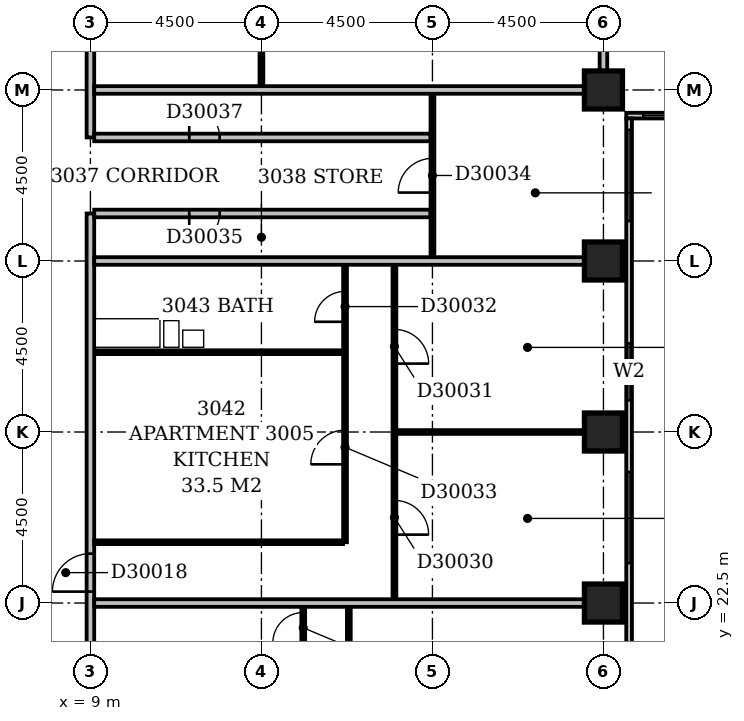
"""IFC4 building model, lengths in metres.
Left out: names, types, materials, properties, quantities, classifications, styles, units other than length and angle.
Written with IfcOpenShell. Run it as: python <this file> out.ifc"""

import sys

from ifc_helpers import new_model, si_unit, direction, frame, frame_2d, origin, origin_2d, place, context, subcontext, project, spatial, rectangle, extrude, element, fill, save


model = new_model("IFC4")
c1 = context("Model", 3, precision=1e-05, world=origin(), true_north=direction((0.0, 1.0)))
c2 = subcontext(c1, "Body", "Model", "MODEL_VIEW")
j1 = project(units=[si_unit("LENGTHUNIT", "METRE"), si_unit("PLANEANGLEUNIT", "RADIAN")], contexts=[c1])
p1 = place(None, origin())
s1 = spatial("IfcSite", under=j1, at=p1, CompositionType="ELEMENT")
p2 = place(p1, origin())
s2 = spatial("IfcBuilding", under=s1, at=p2, CompositionType="ELEMENT")
p3 = place(p2, frame((0.0, 0.0, 123.2)))
s3 = spatial("IfcBuildingStorey", under=s2, at=p3, CompositionType="ELEMENT", Elevation=123.2)
for number, where, z_axis, x_axis in (
    (1, (22.5, 22.5, -0.3), (0.0, 0.0, 1.0), (1.0, 0.0, 0.0)),
    (2, (22.5, 27.0, -0.3), (0.0, 0.0, 1.0), (1.0, 0.0, 0.0)),
    (3, (22.5, 31.5, -0.3), (0.0, 0.0, 1.0), (1.0, 0.0, 0.0)),
    (4, (22.5, 36.0, -0.3), (0.0, 0.0, 1.0), (1.0, 0.0, 0.0)),
):
    element("IfcColumn", number, at=place(p3, frame(where, z_axis=z_axis, x_axis=x_axis)), inside=s3, PredefinedType="COLUMN", context=c2, shape_type="SweptSolid", body=[
        extrude(rectangle(XDim=1.0, YDim=1.0, at=origin_2d()), origin(), (0.0, 0.0, 1.0), 3.6),
    ])
p4 = place(p3, frame((23.175, 17.4, 0.0), z_axis=(0.0, 0.0, 1.0), x_axis=(0.0, 1.0, 0.0)))
e5 = element("IfcWall", 5, at=p4, inside=s3, PredefinedType="STANDARD", context=c2, shape_type="SweptSolid", body=[
    extrude(rectangle(XDim=17.85, YDim=0.15, at=frame_2d((8.925, 0.0))), origin(), (0.0, 0.0, 1.0), 2.7),
])
p5 = place(p4, frame((1.65, 0.0, 0.6)))
e6 = element("IfcOpeningElement", 6, at=p5, cuts=e5, PredefinedType="OPENING", context=c2, shape_type="SweptSolid", body=[
    extrude(rectangle(XDim=2.4, YDim=1.8, at=frame_2d((1.2, 0.9))), frame((0.0, 0.087, 0.0), z_axis=(0.0, -1.0, 0.0), x_axis=(1.0, 0.0, 0.0)), (0.0, 0.0, 1.0), 0.174),
])
p6 = place(p4, frame((6.15, 0.0, 0.6)))
e7 = element("IfcOpeningElement", 7, at=p6, cuts=e5, PredefinedType="OPENING", context=c2, shape_type="SweptSolid", body=[
    extrude(rectangle(XDim=2.4, YDim=1.8, at=frame_2d((1.2, 0.9))), frame((0.0, 0.087, 0.0), z_axis=(0.0, -1.0, 0.0), x_axis=(1.0, 0.0, 0.0)), (0.0, 0.0, 1.0), 0.174),
])
p7 = place(p4, frame((10.433, 0.0, 0.6)))
e8 = element("IfcOpeningElement", 8, at=p7, cuts=e5, PredefinedType="OPENING", context=c2, shape_type="SweptSolid", body=[
    extrude(rectangle(XDim=1.5, YDim=1.8, at=frame_2d((0.75, 0.9))), frame((0.0, 0.087, 0.0), z_axis=(0.0, -1.0, 0.0), x_axis=(1.0, 0.0, 0.0)), (0.0, 0.0, 1.0), 0.174),
])
p8 = place(p4, frame((15.15, 0.0, 0.6)))
e9 = element("IfcOpeningElement", 9, at=p8, cuts=e5, PredefinedType="OPENING", context=c2, shape_type="SweptSolid", body=[
    extrude(rectangle(XDim=2.4, YDim=1.8, at=frame_2d((1.2, 0.9))), frame((0.0, 0.087, 0.0), z_axis=(0.0, -1.0, 0.0), x_axis=(1.0, 0.0, 0.0)), (0.0, 0.0, 1.0), 0.174),
])
p9 = place(p3, frame((23.1, 35.325, 0.0), z_axis=(0.0, 0.0, 1.0), x_axis=(1.0, 0.0, 0.0)))
e10 = element("IfcWall", 10, at=p9, inside=s3, PredefinedType="STANDARD", context=c2, shape_type="SweptSolid", body=[
    extrude(rectangle(XDim=45.15, YDim=0.15, at=frame_2d((22.575, 0.0))), origin(), (0.0, 0.0, 1.0), 2.7),
])
p10 = place(p9, frame((0.45, 0.0, 0.6)))
e11 = element("IfcOpeningElement", 11, at=p10, cuts=e10, PredefinedType="OPENING", context=c2, shape_type="SweptSolid", body=[
    extrude(rectangle(XDim=2.4, YDim=1.8, at=frame_2d((1.2, 0.9))), frame((0.0, 0.087, 0.0), z_axis=(0.0, -1.0, 0.0), x_axis=(1.0, 0.0, 0.0)), (0.0, 0.0, 1.0), 0.174),
])
p11 = place(p9, frame((4.95, 0.0, 0.6)))
e12 = element("IfcOpeningElement", 12, at=p11, cuts=e10, PredefinedType="OPENING", context=c2, shape_type="SweptSolid", body=[
    extrude(rectangle(XDim=2.4, YDim=1.8, at=frame_2d((1.2, 0.9))), frame((0.0, 0.087, 0.0), z_axis=(0.0, -1.0, 0.0), x_axis=(1.0, 0.0, 0.0)), (0.0, 0.0, 1.0), 0.174),
])
p12 = place(p9, frame((10.598, 0.0, 0.6)))
e13 = element("IfcOpeningElement", 13, at=p12, cuts=e10, PredefinedType="OPENING", context=c2, shape_type="SweptSolid", body=[
    extrude(rectangle(XDim=1.5, YDim=1.8, at=frame_2d((0.75, 0.9))), frame((0.0, 0.087, 0.0), z_axis=(0.0, -1.0, 0.0), x_axis=(1.0, 0.0, 0.0)), (0.0, 0.0, 1.0), 0.174),
])
p13 = place(p9, frame((13.66, 0.0, 0.6)))
e14 = element("IfcOpeningElement", 14, at=p13, cuts=e10, PredefinedType="OPENING", context=c2, shape_type="SweptSolid", body=[
    extrude(rectangle(XDim=1.8, YDim=1.8, at=frame_2d((0.9, 0.9))), frame((0.0, 0.087, 0.0), z_axis=(0.0, -1.0, 0.0), x_axis=(1.0, 0.0, 0.0)), (0.0, 0.0, 1.0), 0.174),
])
p14 = place(p9, frame((18.45, 0.0, 0.6)))
e15 = element("IfcOpeningElement", 15, at=p14, cuts=e10, PredefinedType="OPENING", context=c2, shape_type="SweptSolid", body=[
    extrude(rectangle(XDim=2.4, YDim=1.8, at=frame_2d((1.2, 0.9))), frame((0.0, 0.087, 0.0), z_axis=(0.0, -1.0, 0.0), x_axis=(1.0, 0.0, 0.0)), (0.0, 0.0, 1.0), 0.174),
])
p15 = place(p9, frame((22.95, 0.0, 0.6)))
e16 = element("IfcOpeningElement", 16, at=p15, cuts=e10, PredefinedType="OPENING", context=c2, shape_type="SweptSolid", body=[
    extrude(rectangle(XDim=2.4, YDim=1.8, at=frame_2d((1.2, 0.9))), frame((0.0, 0.087, 0.0), z_axis=(0.0, -1.0, 0.0), x_axis=(1.0, 0.0, 0.0)), (0.0, 0.0, 1.0), 0.174),
])
p16 = place(p9, frame((27.45, 0.0, 0.6)))
e17 = element("IfcOpeningElement", 17, at=p16, cuts=e10, PredefinedType="OPENING", context=c2, shape_type="SweptSolid", body=[
    extrude(rectangle(XDim=2.4, YDim=1.8, at=frame_2d((1.2, 0.9))), frame((0.0, 0.087, 0.0), z_axis=(0.0, -1.0, 0.0), x_axis=(1.0, 0.0, 0.0)), (0.0, 0.0, 1.0), 0.174),
])
p17 = place(p9, frame((31.95, 0.0, 0.6)))
e18 = element("IfcOpeningElement", 18, at=p17, cuts=e10, PredefinedType="OPENING", context=c2, shape_type="SweptSolid", body=[
    extrude(rectangle(XDim=2.4, YDim=1.8, at=frame_2d((1.2, 0.9))), frame((0.0, 0.087, 0.0), z_axis=(0.0, -1.0, 0.0), x_axis=(1.0, 0.0, 0.0)), (0.0, 0.0, 1.0), 0.174),
])
p18 = place(p9, frame((36.131, 0.0, 0.6)))
e19 = element("IfcOpeningElement", 19, at=p18, cuts=e10, PredefinedType="OPENING", context=c2, shape_type="SweptSolid", body=[
    extrude(rectangle(XDim=2.4, YDim=1.8, at=frame_2d((1.2, 0.9))), frame((0.0, 0.087, 0.0), z_axis=(0.0, -1.0, 0.0), x_axis=(1.0, 0.0, 0.0)), (0.0, 0.0, 1.0), 0.174),
])
p19 = place(p9, frame((40.95, 0.0, 0.6)))
e20 = element("IfcOpeningElement", 20, at=p19, cuts=e10, PredefinedType="OPENING", context=c2, shape_type="SweptSolid", body=[
    extrude(rectangle(XDim=2.4, YDim=1.8, at=frame_2d((1.2, 0.9))), frame((0.0, 0.087, 0.0), z_axis=(0.0, -1.0, 0.0), x_axis=(1.0, 0.0, 0.0)), (0.0, 0.0, 1.0), 0.174),
])
p20 = place(p3, frame((9.0, 5.0, 0.0), z_axis=(0.0, 0.0, 1.0), x_axis=(0.0, 1.0, 0.0)))
e21 = element("IfcWall", 21, at=p20, inside=s3, PredefinedType="PARTITIONING", context=c2, shape_type="SweptSolid", body=[
    extrude(rectangle(XDim=27.75, YDim=0.2, at=frame_2d((13.875, 0.0))), origin(), (0.0, 0.0, 1.0), 3.3),
])
p21 = place(p20, frame((17.8, 0.0, 0.0)))
e22 = element("IfcOpeningElement", 22, at=p21, cuts=e21, PredefinedType="OPENING", context=c2, shape_type="SweptSolid", body=[
    extrude(rectangle(XDim=1.0, YDim=2.1, at=frame_2d((0.5, 1.05))), frame((0.0, 0.112, 0.0), z_axis=(0.0, -1.0, 0.0), x_axis=(1.0, 0.0, 0.0)), (0.0, 0.0, 1.0), 0.224),
])
p22 = place(p20, frame((14.95, 0.0, 0.0)))
e23 = element("IfcOpeningElement", 23, at=p22, cuts=e21, PredefinedType="OPENING", context=c2, shape_type="SweptSolid", body=[
    extrude(rectangle(XDim=1.0, YDim=2.1, at=frame_2d((0.5, 1.05))), frame((0.0, 0.112, 0.0), z_axis=(0.0, -1.0, 0.0), x_axis=(1.0, 0.0, 0.0)), (0.0, 0.0, 1.0), 0.224),
])
p23 = place(p20, frame((9.3, 0.0, 0.0)))
e24 = element("IfcOpeningElement", 24, at=p23, cuts=e21, PredefinedType="OPENING", context=c2, shape_type="SweptSolid", body=[
    extrude(rectangle(XDim=1.0, YDim=2.1, at=frame_2d((0.5, 1.05))), frame((0.0, 0.112, 0.0), z_axis=(0.0, -1.0, 0.0), x_axis=(1.0, 0.0, 0.0)), (0.0, 0.0, 1.0), 0.224),
])
p24 = place(p20, frame((1.5, 0.0, 0.0)))
e25 = element("IfcOpeningElement", 25, at=p24, cuts=e21, PredefinedType="OPENING", context=c2, shape_type="SweptSolid", body=[
    extrude(rectangle(XDim=0.9, YDim=2.1, at=frame_2d((0.45, 1.05))), frame((0.0, 0.112, 0.0), z_axis=(0.0, -1.0, 0.0), x_axis=(1.0, 0.0, 0.0)), (0.0, 0.0, 1.0), 0.224),
])
p25 = place(p3, frame((15.8, 18.1, 0.0), z_axis=(0.0, 0.0, 1.0), x_axis=(0.0, 1.0, 0.0)))
e26 = element("IfcWall", 26, at=p25, inside=s3, PredefinedType="PARTITIONING", context=c2, shape_type="SweptSolid", body=[
    extrude(rectangle(XDim=4.3, YDim=0.1, at=frame_2d((2.15, 0.0))), origin(), (0.0, 0.0, 1.0), 3.3),
])
p26 = place(p25, frame((1.7, 0.0, 0.0)))
e27 = element("IfcOpeningElement", 27, at=p26, cuts=e26, PredefinedType="OPENING", context=c2, shape_type="SweptSolid", body=[
    extrude(rectangle(XDim=0.9, YDim=2.1, at=frame_2d((0.45, 1.05))), frame((0.0, 0.062, 0.0), z_axis=(0.0, -1.0, 0.0), x_axis=(1.0, 0.0, 0.0)), (0.0, 0.0, 1.0), 0.124),
])
p27 = place(p3, frame((14.6, 21.2, 0.0), z_axis=(0.0, 0.0, 1.0), x_axis=(0.0, 1.0, 0.0)))
e28 = element("IfcWall", 28, at=p27, inside=s3, PredefinedType="PARTITIONING", context=c2, shape_type="SweptSolid", body=[
    extrude(rectangle(XDim=1.2, YDim=0.1, at=frame_2d((0.6, 0.0))), origin(), (0.0, 0.0, 1.0), 3.3),
])
p28 = place(p27, frame((0.25, 0.0, 0.0)))
e29 = element("IfcOpeningElement", 29, at=p28, cuts=e28, PredefinedType="OPENING", context=c2, shape_type="SweptSolid", body=[
    extrude(rectangle(XDim=0.8, YDim=2.1, at=frame_2d((0.4, 1.05))), frame((0.0, 0.062, 0.0), z_axis=(0.0, -1.0, 0.0), x_axis=(1.0, 0.0, 0.0)), (0.0, 0.0, 1.0), 0.124),
])
p29 = place(p3, frame((9.1, 22.5, 0.0), z_axis=(0.0, 0.0, 1.0), x_axis=(1.0, 0.0, 0.0)))
e30 = element("IfcWall", 30, at=p29, inside=s3, PredefinedType="PARTITIONING", context=c2, shape_type="SweptSolid", body=[
    extrude(rectangle(XDim=12.9, YDim=0.2, at=frame_2d((6.45, 0.0))), origin(), (0.0, 0.0, 1.0), 3.3),
])
p30 = place(p3, frame((17.0, 22.6, 0.0), z_axis=(0.0, 0.0, 1.0), x_axis=(0.0, 1.0, 0.0)))
e31 = element("IfcWall", 31, at=p30, inside=s3, PredefinedType="PARTITIONING", context=c2, shape_type="SweptSolid", body=[
    extrude(rectangle(XDim=8.8, YDim=0.1, at=frame_2d((4.4, 0.0))), origin(), (0.0, 0.0, 1.0), 3.3),
])
p31 = place(p30, frame((1.7, 0.0, 0.0)))
e32 = element("IfcOpeningElement", 32, at=p31, cuts=e31, PredefinedType="OPENING", context=c2, shape_type="SweptSolid", body=[
    extrude(rectangle(XDim=0.9, YDim=2.1, at=frame_2d((0.45, 1.05))), frame((0.0, 0.062, 0.0), z_axis=(0.0, -1.0, 0.0), x_axis=(1.0, 0.0, 0.0)), (0.0, 0.0, 1.0), 0.124),
])
p32 = place(p30, frame((6.2, 0.0, 0.0)))
e33 = element("IfcOpeningElement", 33, at=p32, cuts=e31, PredefinedType="OPENING", context=c2, shape_type="SweptSolid", body=[
    extrude(rectangle(XDim=0.9, YDim=2.1, at=frame_2d((0.45, 1.05))), frame((0.0, 0.062, 0.0), z_axis=(0.0, -1.0, 0.0), x_axis=(1.0, 0.0, 0.0)), (0.0, 0.0, 1.0), 0.124),
])
p33 = place(p3, frame((9.1, 24.1, 0.0), z_axis=(0.0, 0.0, 1.0), x_axis=(1.0, 0.0, 0.0)))
e34 = element("IfcWall", 34, at=p33, inside=s3, PredefinedType="PARTITIONING", context=c2, shape_type="SweptSolid", body=[
    extrude(rectangle(XDim=6.55, YDim=0.1, at=frame_2d((3.275, 0.0))), origin(), (0.0, 0.0, 1.0), 3.3),
])
p34 = place(p3, frame((15.7, 24.1, 0.0), z_axis=(0.0, 0.0, 1.0), x_axis=(0.0, 1.0, 0.0)))
e35 = element("IfcWall", 35, at=p34, inside=s3, PredefinedType="PARTITIONING", context=c2, shape_type="SweptSolid", body=[
    extrude(rectangle(XDim=7.3, YDim=0.1, at=frame_2d((3.65, 0.0))), origin(), (0.0, 0.0, 1.0), 3.3),
])
p35 = place(p34, frame((5.8, 0.0, 0.0)))
e36 = element("IfcOpeningElement", 36, at=p35, cuts=e35, PredefinedType="OPENING", context=c2, shape_type="SweptSolid", body=[
    extrude(rectangle(XDim=0.8, YDim=2.1, at=frame_2d((0.4, 1.05))), frame((0.0, 0.062, 0.0), z_axis=(0.0, -1.0, 0.0), x_axis=(1.0, 0.0, 0.0)), (0.0, 0.0, 1.0), 0.124),
])
p36 = place(p34, frame((2.05, 0.0, 0.0)))
e37 = element("IfcOpeningElement", 37, at=p36, cuts=e35, PredefinedType="OPENING", context=c2, shape_type="SweptSolid", body=[
    extrude(rectangle(XDim=0.9, YDim=2.1, at=frame_2d((0.45, 1.05))), frame((0.0, 0.062, 0.0), z_axis=(0.0, -1.0, 0.0), x_axis=(1.0, 0.0, 0.0)), (0.0, 0.0, 1.0), 0.124),
])
p37 = place(p3, frame((17.05, 27.0, 0.0), z_axis=(0.0, 0.0, 1.0), x_axis=(1.0, 0.0, 0.0)))
e38 = element("IfcWall", 38, at=p37, inside=s3, PredefinedType="PARTITIONING", context=c2, shape_type="SweptSolid", body=[
    extrude(rectangle(XDim=4.95, YDim=0.1, at=frame_2d((2.475, 0.0))), origin(), (0.0, 0.0, 1.0), 2.7),
])
p38 = place(p3, frame((9.1, 29.1, 0.0), z_axis=(0.0, 0.0, 1.0), x_axis=(1.0, 0.0, 0.0)))
e39 = element("IfcWall", 39, at=p38, inside=s3, PredefinedType="PLUMBINGWALL", context=c2, shape_type="SweptSolid", body=[
    extrude(rectangle(XDim=6.55, YDim=0.1, at=frame_2d((3.275, 0.0))), origin(), (0.0, 0.0, 1.0), 3.3),
])
p39 = place(p3, frame((9.1, 31.5, 0.0), z_axis=(0.0, 0.0, 1.0), x_axis=(1.0, 0.0, 0.0)))
e40 = element("IfcWall", 40, at=p39, inside=s3, PredefinedType="PARTITIONING", context=c2, shape_type="SweptSolid", body=[
    extrude(rectangle(XDim=12.9, YDim=0.2, at=frame_2d((6.45, 0.0))), origin(), (0.0, 0.0, 1.0), 3.3),
])
p40 = place(p3, frame((18.0, 31.6, 0.0), z_axis=(0.0, 0.0, 1.0), x_axis=(0.0, 1.0, 0.0)))
e41 = element("IfcWall", 41, at=p40, inside=s3, PredefinedType="PARTITIONING", context=c2, shape_type="SweptSolid", body=[
    extrude(rectangle(XDim=4.3, YDim=0.1, at=frame_2d((2.15, 0.0))), origin(), (0.0, 0.0, 1.0), 3.3),
])
p41 = place(p40, frame((1.7, 0.0, 0.0)))
e42 = element("IfcOpeningElement", 42, at=p41, cuts=e41, PredefinedType="OPENING", context=c2, shape_type="SweptSolid", body=[
    extrude(rectangle(XDim=0.9, YDim=2.1, at=frame_2d((0.45, 1.05))), frame((0.0, 0.062, 0.0), z_axis=(0.0, -1.0, 0.0), x_axis=(1.0, 0.0, 0.0)), (0.0, 0.0, 1.0), 0.124),
])
p42 = place(p3, frame((9.1, 32.75, 0.0), z_axis=(0.0, 0.0, 1.0), x_axis=(1.0, 0.0, 0.0)))
e43 = element("IfcWall", 43, at=p42, inside=s3, PredefinedType="PARTITIONING", context=c2, shape_type="SweptSolid", body=[
    extrude(rectangle(XDim=8.85, YDim=0.2, at=frame_2d((4.425, 0.0))), origin(), (0.0, 0.0, 1.0), 3.3),
])
p43 = place(p42, frame((2.5, 0.0, 0.0)))
e44 = element("IfcOpeningElement", 44, at=p43, cuts=e43, PredefinedType="OPENING", context=c2, shape_type="SweptSolid", body=[
    extrude(rectangle(XDim=0.8, YDim=2.1, at=frame_2d((0.4, 1.05))), frame((0.0, 0.112, 0.0), z_axis=(0.0, -1.0, 0.0), x_axis=(1.0, 0.0, 0.0)), (0.0, 0.0, 1.0), 0.224),
])
p44 = place(p3, frame((9.0, 34.75, 0.0), z_axis=(0.0, 0.0, 1.0), x_axis=(0.0, 1.0, 0.0)))
e45 = element("IfcWall", 45, at=p44, inside=s3, PredefinedType="PARTITIONING", context=c2, shape_type="SweptSolid", body=[
    extrude(rectangle(XDim=14.75, YDim=0.2, at=frame_2d((7.375, 0.0))), origin(), (0.0, 0.0, 1.0), 3.3),
])
p45 = place(p44, frame((7.5, 0.0, 0.0)))
e46 = element("IfcOpeningElement", 46, at=p45, cuts=e45, PredefinedType="OPENING", context=c2, shape_type="SweptSolid", body=[
    extrude(rectangle(XDim=0.9, YDim=2.1, at=frame_2d((0.45, 1.05))), frame((0.0, 0.112, 0.0), z_axis=(0.0, -1.0, 0.0), x_axis=(1.0, 0.0, 0.0)), (0.0, 0.0, 1.0), 0.224),
])
p46 = place(p3, frame((9.1, 34.75, 0.0), z_axis=(0.0, 0.0, 1.0), x_axis=(1.0, 0.0, 0.0)))
e47 = element("IfcWall", 47, at=p46, inside=s3, PredefinedType="PARTITIONING", context=c2, shape_type="SweptSolid", body=[
    extrude(rectangle(XDim=8.85, YDim=0.2, at=frame_2d((4.425, 0.0))), origin(), (0.0, 0.0, 1.0), 3.3),
])
p47 = place(p46, frame((2.5, 0.0, 0.0)))
e48 = element("IfcOpeningElement", 48, at=p47, cuts=e47, PredefinedType="OPENING", context=c2, shape_type="SweptSolid", body=[
    extrude(rectangle(XDim=0.8, YDim=2.1, at=frame_2d((0.4, 1.05))), frame((0.0, 0.112, 0.0), z_axis=(0.0, -1.0, 0.0), x_axis=(1.0, 0.0, 0.0)), (0.0, 0.0, 1.0), 0.224),
])
p48 = place(p3, frame((9.1, 36.0, 0.0), z_axis=(0.0, 0.0, 1.0), x_axis=(1.0, 0.0, 0.0)))
e49 = element("IfcWall", 49, at=p48, inside=s3, PredefinedType="PARTITIONING", context=c2, shape_type="SweptSolid", body=[
    extrude(rectangle(XDim=12.9, YDim=0.2, at=frame_2d((6.45, 0.0))), origin(), (0.0, 0.0, 1.0), 3.3),
])
p49 = place(p3, frame((13.5, 36.1, 0.0), z_axis=(0.0, 0.0, 1.0), x_axis=(0.0, 1.0, 0.0)))
e50 = element("IfcWall", 50, at=p49, inside=s3, PredefinedType="PARTITIONING", context=c2, shape_type="SweptSolid", body=[
    extrude(rectangle(XDim=13.3, YDim=0.1, at=frame_2d((6.65, 0.0))), origin(), (0.0, 0.0, 1.0), 3.3),
])
p50 = place(p3, frame((22.5, 36.5, 0.0), z_axis=(0.0, 0.0, 1.0), x_axis=(0.0, 1.0, 0.0)))
e51 = element("IfcWall", 51, at=p50, inside=s3, PredefinedType="PARTITIONING", context=c2, shape_type="SweptSolid", body=[
    extrude(rectangle(XDim=12.9, YDim=0.2, at=frame_2d((6.45, 0.0))), origin(), (0.0, 0.0, 1.0), 3.3),
])
p51 = place(p6, origin())
e52 = element("IfcWindow", 52, at=p51, inside=s3, PartitioningType="SINGLE_PANEL", PredefinedType="WINDOW", context=c2, shape_type="SweptSolid", body=[
    extrude(rectangle(XDim=2.4, YDim=1.8, at=frame_2d((1.2, 0.9))), frame((0.0, 0.03, 0.0), z_axis=(0.0, -1.0, 0.0), x_axis=(1.0, 0.0, 0.0)), (0.0, 0.0, 1.0), 0.06),
])
fill(e7, e52)
p52 = place(p7, origin())
e53 = element("IfcWindow", 53, at=p52, inside=s3, PartitioningType="SINGLE_PANEL", PredefinedType="WINDOW", context=c2, shape_type="SweptSolid", body=[
    extrude(rectangle(XDim=1.5, YDim=1.8, at=frame_2d((0.75, 0.9))), frame((0.0, 0.03, 0.0), z_axis=(0.0, -1.0, 0.0), x_axis=(1.0, 0.0, 0.0)), (0.0, 0.0, 1.0), 0.06),
])
fill(e8, e53)
p53 = place(p8, origin())
e54 = element("IfcWindow", 54, at=p53, inside=s3, PartitioningType="SINGLE_PANEL", PredefinedType="WINDOW", context=c2, shape_type="SweptSolid", body=[
    extrude(rectangle(XDim=2.4, YDim=1.8, at=frame_2d((1.2, 0.9))), frame((0.0, 0.03, 0.0), z_axis=(0.0, -1.0, 0.0), x_axis=(1.0, 0.0, 0.0)), (0.0, 0.0, 1.0), 0.06),
])
fill(e9, e54)
p54 = place(p10, origin())
e55 = element("IfcWindow", 55, at=p54, inside=s3, PartitioningType="SINGLE_PANEL", PredefinedType="WINDOW", context=c2, shape_type="SweptSolid", body=[
    extrude(rectangle(XDim=2.4, YDim=1.8, at=frame_2d((1.2, 0.9))), frame((0.0, 0.03, 0.0), z_axis=(0.0, -1.0, 0.0), x_axis=(1.0, 0.0, 0.0)), (0.0, 0.0, 1.0), 0.06),
])
fill(e11, e55)
p55 = place(p21, origin())
e56 = element("IfcDoor", 56, at=p55, inside=s3, OperationType="SINGLE_SWING_LEFT", PredefinedType="DOOR", context=c2, shape_type="SweptSolid", body=[
    extrude(rectangle(XDim=1.0, YDim=2.1, at=frame_2d((0.5, 1.05))), frame((0.0, 0.025, 0.0), z_axis=(0.0, -1.0, 0.0), x_axis=(1.0, 0.0, 0.0)), (0.0, 0.0, 1.0), 0.05),
])
fill(e22, e56)
p56 = place(p28, origin())
e57 = element("IfcDoor", 57, at=p56, inside=s3, OperationType="SINGLE_SWING_LEFT", PredefinedType="DOOR", context=c2, shape_type="SweptSolid", body=[
    extrude(rectangle(XDim=0.8, YDim=2.1, at=frame_2d((0.4, 1.05))), frame((0.0, 0.025, 0.0), z_axis=(0.0, -1.0, 0.0), x_axis=(1.0, 0.0, 0.0)), (0.0, 0.0, 1.0), 0.05),
])
fill(e29, e57)
p57 = place(p31, frame((0.9, 0.0, 0.0), z_axis=(0.0, 0.0, 1.0), x_axis=(-1.0, 0.0, 0.0)))
e58 = element("IfcDoor", 58, at=p57, inside=s3, OperationType="SINGLE_SWING_RIGHT", PredefinedType="DOOR", context=c2, shape_type="SweptSolid", body=[
    extrude(rectangle(XDim=0.9, YDim=2.1, at=frame_2d((0.45, 1.05))), frame((0.0, 0.025, 0.0), z_axis=(0.0, -1.0, 0.0), x_axis=(1.0, 0.0, 0.0)), (0.0, 0.0, 1.0), 0.05),
])
fill(e32, e58)
p58 = place(p32, frame((0.9, 0.0, 0.0), z_axis=(0.0, 0.0, 1.0), x_axis=(-1.0, 0.0, 0.0)))
e59 = element("IfcDoor", 59, at=p58, inside=s3, OperationType="SINGLE_SWING_RIGHT", PredefinedType="DOOR", context=c2, shape_type="SweptSolid", body=[
    extrude(rectangle(XDim=0.9, YDim=2.1, at=frame_2d((0.45, 1.05))), frame((0.0, 0.025, 0.0), z_axis=(0.0, -1.0, 0.0), x_axis=(1.0, 0.0, 0.0)), (0.0, 0.0, 1.0), 0.05),
])
fill(e33, e59)
p59 = place(p35, origin())
e60 = element("IfcDoor", 60, at=p59, inside=s3, OperationType="SINGLE_SWING_LEFT", PredefinedType="DOOR", context=c2, shape_type="SweptSolid", body=[
    extrude(rectangle(XDim=0.8, YDim=2.1, at=frame_2d((0.4, 1.05))), frame((0.0, 0.025, 0.0), z_axis=(0.0, -1.0, 0.0), x_axis=(1.0, 0.0, 0.0)), (0.0, 0.0, 1.0), 0.05),
])
fill(e36, e60)
p60 = place(p36, origin())
e61 = element("IfcDoor", 61, at=p60, inside=s3, OperationType="SINGLE_SWING_LEFT", PredefinedType="DOOR", context=c2, shape_type="SweptSolid", body=[
    extrude(rectangle(XDim=0.9, YDim=2.1, at=frame_2d((0.45, 1.05))), frame((0.0, 0.025, 0.0), z_axis=(0.0, -1.0, 0.0), x_axis=(1.0, 0.0, 0.0)), (0.0, 0.0, 1.0), 0.05),
])
fill(e37, e61)
p61 = place(p41, origin())
e62 = element("IfcDoor", 62, at=p61, inside=s3, OperationType="SINGLE_SWING_LEFT", PredefinedType="DOOR", context=c2, shape_type="SweptSolid", body=[
    extrude(rectangle(XDim=0.9, YDim=2.1, at=frame_2d((0.45, 1.05))), frame((0.0, 0.025, 0.0), z_axis=(0.0, -1.0, 0.0), x_axis=(1.0, 0.0, 0.0)), (0.0, 0.0, 1.0), 0.05),
])
fill(e42, e62)
p62 = place(p43, frame((0.8, 0.0, 0.0), z_axis=(0.0, 0.0, 1.0), x_axis=(-1.0, 0.0, 0.0)))
e63 = element("IfcDoor", 63, at=p62, inside=s3, OperationType="SINGLE_SWING_RIGHT", PredefinedType="DOOR", context=c2, shape_type="SweptSolid", body=[
    extrude(rectangle(XDim=0.8, YDim=2.1, at=frame_2d((0.4, 1.05))), frame((0.0, 0.025, 0.0), z_axis=(0.0, -1.0, 0.0), x_axis=(1.0, 0.0, 0.0)), (0.0, 0.0, 1.0), 0.05),
])
fill(e44, e63)
p63 = place(p47, origin())
e64 = element("IfcDoor", 64, at=p63, inside=s3, OperationType="SINGLE_SWING_LEFT", PredefinedType="DOOR", context=c2, shape_type="SweptSolid", body=[
    extrude(rectangle(XDim=0.8, YDim=2.1, at=frame_2d((0.4, 1.05))), frame((0.0, 0.025, 0.0), z_axis=(0.0, -1.0, 0.0), x_axis=(1.0, 0.0, 0.0)), (0.0, 0.0, 1.0), 0.05),
])
fill(e48, e64)
save(model, sys.argv[1])
